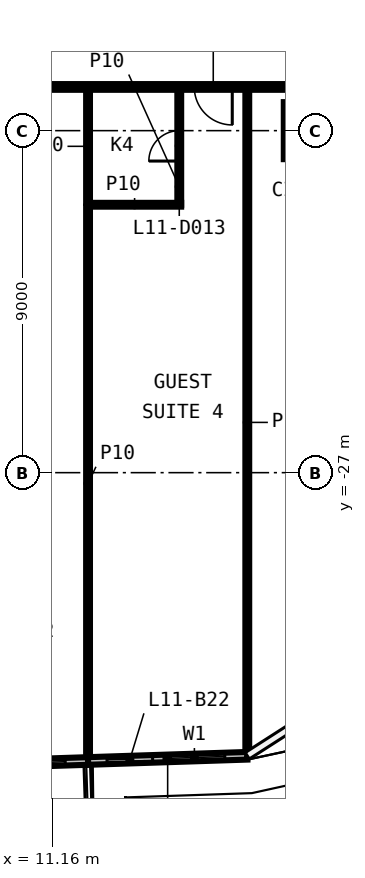
"""IFC4 building model, lengths in metres.
Left out: names, types, materials, properties, quantities, classifications, styles, units other than length and angle.
Written with IfcOpenShell. Run it as: python <this file> out.ifc"""

import sys

from ifc_helpers import new_model, si_unit, direction, frame, frame_2d, origin, origin_2d, place, context, subcontext, project, spatial, rectangle, extrude, element, fill, save


model = new_model("IFC4")
c1 = context("Model", 3, precision=1e-05, world=origin(), true_north=direction((0.0, 1.0)))
c2 = subcontext(c1, "Body", "Model", "MODEL_VIEW")
j1 = project(units=[si_unit("LENGTHUNIT", "METRE"), si_unit("PLANEANGLEUNIT", "RADIAN")], contexts=[c1])
p1 = place(None, origin())
s1 = spatial("IfcSite", under=j1, at=p1, CompositionType="ELEMENT")
p2 = place(p1, origin())
s2 = spatial("IfcBuilding", under=s1, at=p2, CompositionType="ELEMENT")
p3 = place(p2, frame((0.0, 0.0, 62.5)))
s3 = spatial("IfcBuildingStorey", under=s2, at=p3, CompositionType="ELEMENT", Elevation=62.5)
p4 = place(p3, frame((18.0, -18.0, 0.0), z_axis=(0.0, 0.0, 1.0), x_axis=(1.0, 0.0, 0.0)))
e1 = element("IfcColumn", 1, at=p4, inside=s3, PredefinedType="COLUMN", context=c2, shape_type="SweptSolid", body=[
    extrude(rectangle(XDim=1.5, YDim=1.5, at=origin_2d()), origin(), (0.0, 0.0, 1.0), 3.3),
])
p5 = place(p3, frame((12.099, -19.95, 0.0), z_axis=(0.0, 0.0, 1.0), x_axis=(1.0, 0.0, 0.0)))
e2 = element("IfcWall", 2, at=p5, inside=s3, PredefinedType="PARTITIONING", context=c2, shape_type="SweptSolid", body=[
    extrude(rectangle(XDim=2.45, YDim=0.1, at=frame_2d((1.225, 0.0))), origin(), (0.0, 0.0, 1.0), 3.3),
])
p6 = place(p3, frame((19.925, -16.85, 0.0), z_axis=(0.0, 0.0, 1.0), x_axis=(-1.0, 0.0, 0.0)))
e3 = element("IfcWall", 3, at=p6, inside=s3, PredefinedType="PARTITIONING", context=c2, shape_type="SweptSolid", body=[
    extrude(rectangle(XDim=39.85, YDim=0.15, at=frame_2d((19.925, 0.0))), origin(), (0.0, 0.0, 1.0), 3.3),
])
p7 = place(p6, frame((35.041, 0.0, 0.0)))
e4 = element("IfcOpeningElement", 4, at=p7, cuts=e3, PredefinedType="OPENING", context=c2, shape_type="SweptSolid", body=[
    extrude(rectangle(XDim=0.9, YDim=2.1, at=frame_2d((0.45, 1.05))), frame((0.0, 0.085, 0.0), z_axis=(0.0, -1.0, 0.0), x_axis=(1.0, 0.0, 0.0)), (0.0, 0.0, 1.0), 0.17),
])
p8 = place(p6, frame((31.0, 0.0, 0.0)))
e5 = element("IfcOpeningElement", 5, at=p8, cuts=e3, PredefinedType="OPENING", context=c2, shape_type="SweptSolid", body=[
    extrude(rectangle(XDim=1.0, YDim=2.1, at=frame_2d((0.5, 1.05))), frame((0.0, 0.085, 0.0), z_axis=(0.0, -1.0, 0.0), x_axis=(1.0, 0.0, 0.0)), (0.0, 0.0, 1.0), 0.17),
])
p9 = place(p6, frame((25.711, 0.0, 0.0)))
e6 = element("IfcOpeningElement", 6, at=p9, cuts=e3, PredefinedType="OPENING", context=c2, shape_type="SweptSolid", body=[
    extrude(rectangle(XDim=0.9, YDim=2.1, at=frame_2d((0.45, 1.05))), frame((0.0, 0.085, 0.0), z_axis=(0.0, -1.0, 0.0), x_axis=(1.0, 0.0, 0.0)), (0.0, 0.0, 1.0), 0.17),
])
p10 = place(p6, frame((22.072, 0.0, 0.0)))
e7 = element("IfcOpeningElement", 7, at=p10, cuts=e3, PredefinedType="OPENING", context=c2, shape_type="SweptSolid", body=[
    extrude(rectangle(XDim=0.9, YDim=2.1, at=frame_2d((0.45, 1.05))), frame((0.0, 0.085, 0.0), z_axis=(0.0, -1.0, 0.0), x_axis=(1.0, 0.0, 0.0)), (0.0, 0.0, 1.0), 0.17),
])
p11 = place(p6, frame((17.034, 0.0, 0.0)))
e8 = element("IfcOpeningElement", 8, at=p11, cuts=e3, PredefinedType="OPENING", context=c2, shape_type="SweptSolid", body=[
    extrude(rectangle(XDim=0.9, YDim=2.1, at=frame_2d((0.45, 1.05))), frame((0.0, 0.085, 0.0), z_axis=(0.0, -1.0, 0.0), x_axis=(1.0, 0.0, 0.0)), (0.0, 0.0, 1.0), 0.17),
])
p12 = place(p6, frame((13.675, 0.0, 0.0)))
e9 = element("IfcOpeningElement", 9, at=p12, cuts=e3, PredefinedType="OPENING", context=c2, shape_type="SweptSolid", body=[
    extrude(rectangle(XDim=0.9, YDim=2.1, at=frame_2d((0.45, 1.05))), frame((0.0, 0.085, 0.0), z_axis=(0.0, -1.0, 0.0), x_axis=(1.0, 0.0, 0.0)), (0.0, 0.0, 1.0), 0.17),
])
p13 = place(p6, frame((4.031, 0.0, 0.0)))
e10 = element("IfcOpeningElement", 10, at=p13, cuts=e3, PredefinedType="OPENING", context=c2, shape_type="SweptSolid", body=[
    extrude(rectangle(XDim=1.0, YDim=2.1, at=frame_2d((0.5, 1.05))), frame((0.0, 0.085, 0.0), z_axis=(0.0, -1.0, 0.0), x_axis=(1.0, 0.0, 0.0)), (0.0, 0.0, 1.0), 0.17),
])
p14 = place(p3, frame((16.289, -34.43, 0.0), z_axis=(0.0, 0.0, 1.0), x_axis=(0.0, 1.0, 0.0)))
e11 = element("IfcWall", 11, at=p14, inside=s3, PredefinedType="PARTITIONING", context=c2, shape_type="SweptSolid", body=[
    extrude(rectangle(XDim=17.505, YDim=0.1, at=frame_2d((8.752, 0.0))), origin(), (0.0, 0.0, 1.0), 3.3),
])
p15 = place(p3, frame((14.499, -19.95, 0.0), z_axis=(0.0, 0.0, 1.0), x_axis=(0.0, 1.0, 0.0)))
e12 = element("IfcWall", 12, at=p15, inside=s3, PredefinedType="PARTITIONING", context=c2, shape_type="SweptSolid", body=[
    extrude(rectangle(XDim=3.025, YDim=0.1, at=frame_2d((1.512, 0.0))), origin(), (0.0, 0.0, 1.0), 3.3),
])
p16 = place(p15, frame((1.15, 0.0, 0.0)))
e13 = element("IfcOpeningElement", 13, at=p16, cuts=e12, PredefinedType="OPENING", context=c2, shape_type="SweptSolid", body=[
    extrude(rectangle(XDim=0.8, YDim=2.1, at=frame_2d((0.4, 1.05))), frame((0.0, 0.06, 0.0), z_axis=(0.0, -1.0, 0.0), x_axis=(1.0, 0.0, 0.0)), (0.0, 0.0, 1.0), 0.12),
])
p17 = place(p3, frame((12.099, -34.567, 0.0), z_axis=(0.0, 0.0, 1.0), x_axis=(0.0, 1.0, 0.0)))
e14 = element("IfcWall", 14, at=p17, inside=s3, PredefinedType="PARTITIONING", context=c2, shape_type="SweptSolid", body=[
    extrude(rectangle(XDim=14.567, YDim=0.1, at=frame_2d((7.284, 0.0))), origin(), (0.0, 0.0, 1.0), 3.3),
])
p18 = place(p3, frame((12.099, -19.9, 0.0), z_axis=(0.0, 0.0, 1.0), x_axis=(0.0, 1.0, 0.0)))
e15 = element("IfcWall", 15, at=p18, inside=s3, PredefinedType="PARTITIONING", context=c2, shape_type="SweptSolid", body=[
    extrude(rectangle(XDim=2.975, YDim=0.1, at=frame_2d((1.487, 0.0))), origin(), (0.0, 0.0, 1.0), 3.3),
])
p19 = place(p3, frame((-4.697, -35.136, 0.0), z_axis=(0.0, 0.0, 1.0), x_axis=(0.999466983916, 0.032645796998, 0.0)))
e16 = element("IfcWall", 16, at=p19, inside=s3, PredefinedType="SOLIDWALL", context=c2, shape_type="SweptSolid", body=[
    extrude(rectangle(XDim=16.804, YDim=0.2, at=frame_2d((8.402, 0.0))), origin(), (0.0, 0.0, 1.0), 3.3),
])
p20 = place(p19, frame((2.0, 0.0, 0.6)))
e17 = element("IfcOpeningElement", 17, at=p20, cuts=e16, PredefinedType="OPENING", context=c2, shape_type="SweptSolid", body=[
    extrude(rectangle(XDim=1.6, YDim=2.4, at=frame_2d((0.8, 1.2))), frame((0.0, 0.11, 0.0), z_axis=(0.0, -1.0, 0.0), x_axis=(1.0, 0.0, 0.0)), (0.0, 0.0, 1.0), 0.22),
])
p21 = place(p19, frame((0.5, 0.0, 0.0)))
e18 = element("IfcOpeningElement", 18, at=p21, cuts=e16, PredefinedType="OPENING", context=c2, shape_type="SweptSolid", body=[
    extrude(rectangle(XDim=1.2, YDim=2.4, at=frame_2d((0.6, 1.2))), frame((0.0, 0.11, 0.0), z_axis=(0.0, -1.0, 0.0), x_axis=(1.0, 0.0, 0.0)), (0.0, 0.0, 1.0), 0.22),
])
p22 = place(p19, frame((6.201, 0.0, 0.6)))
e19 = element("IfcOpeningElement", 19, at=p22, cuts=e16, PredefinedType="OPENING", context=c2, shape_type="SweptSolid", body=[
    extrude(rectangle(XDim=1.6, YDim=2.4, at=frame_2d((0.8, 1.2))), frame((0.0, 0.11, 0.0), z_axis=(0.0, -1.0, 0.0), x_axis=(1.0, 0.0, 0.0)), (0.0, 0.0, 1.0), 0.22),
])
p23 = place(p19, frame((4.701, 0.0, 0.0)))
e20 = element("IfcOpeningElement", 20, at=p23, cuts=e16, PredefinedType="OPENING", context=c2, shape_type="SweptSolid", body=[
    extrude(rectangle(XDim=1.2, YDim=2.4, at=frame_2d((0.6, 1.2))), frame((0.0, 0.11, 0.0), z_axis=(0.0, -1.0, 0.0), x_axis=(1.0, 0.0, 0.0)), (0.0, 0.0, 1.0), 0.22),
])
p24 = place(p19, frame((10.402, 0.0, 0.6)))
e21 = element("IfcOpeningElement", 21, at=p24, cuts=e16, PredefinedType="OPENING", context=c2, shape_type="SweptSolid", body=[
    extrude(rectangle(XDim=1.6, YDim=2.4, at=frame_2d((0.8, 1.2))), frame((0.0, 0.11, 0.0), z_axis=(0.0, -1.0, 0.0), x_axis=(1.0, 0.0, 0.0)), (0.0, 0.0, 1.0), 0.22),
])
p25 = place(p19, frame((8.902, 0.0, 0.0)))
e22 = element("IfcOpeningElement", 22, at=p25, cuts=e16, PredefinedType="OPENING", context=c2, shape_type="SweptSolid", body=[
    extrude(rectangle(XDim=1.2, YDim=2.4, at=frame_2d((0.6, 1.2))), frame((0.0, 0.11, 0.0), z_axis=(0.0, -1.0, 0.0), x_axis=(1.0, 0.0, 0.0)), (0.0, 0.0, 1.0), 0.22),
])
p26 = place(p19, frame((14.603, 0.0, 0.6)))
e23 = element("IfcOpeningElement", 23, at=p26, cuts=e16, PredefinedType="OPENING", context=c2, shape_type="SweptSolid", body=[
    extrude(rectangle(XDim=1.6, YDim=2.4, at=frame_2d((0.8, 1.2))), frame((0.0, 0.11, 0.0), z_axis=(0.0, -1.0, 0.0), x_axis=(1.0, 0.0, 0.0)), (0.0, 0.0, 1.0), 0.22),
])
p27 = place(p19, frame((12.903, 0.0, 0.0)))
e24 = element("IfcOpeningElement", 24, at=p27, cuts=e16, PredefinedType="OPENING", context=c2, shape_type="SweptSolid", body=[
    extrude(rectangle(XDim=1.2, YDim=2.4, at=frame_2d((0.6, 1.2))), frame((0.0, 0.11, 0.0), z_axis=(0.0, -1.0, 0.0), x_axis=(1.0, 0.0, 0.0)), (0.0, 0.0, 1.0), 0.22),
])
p28 = place(p3, frame((12.099, -34.587, 0.0), z_axis=(0.0, 0.0, 1.0), x_axis=(0.999468058802, 0.032612872214, 0.0)))
e25 = element("IfcWall", 25, at=p28, inside=s3, PredefinedType="SOLIDWALL", context=c2, shape_type="SweptSolid", body=[
    extrude(rectangle(XDim=4.192, YDim=0.2, at=frame_2d((2.096, 0.0))), origin(), (0.0, 0.0, 1.0), 3.3),
])
p29 = place(p28, frame((2.0, 0.0, 0.6)))
e26 = element("IfcOpeningElement", 26, at=p29, cuts=e25, PredefinedType="OPENING", context=c2, shape_type="SweptSolid", body=[
    extrude(rectangle(XDim=1.6, YDim=2.4, at=frame_2d((0.8, 1.2))), frame((0.0, 0.11, 0.0), z_axis=(0.0, -1.0, 0.0), x_axis=(1.0, 0.0, 0.0)), (0.0, 0.0, 1.0), 0.22),
])
p30 = place(p28, frame((0.5, 0.0, 0.0)))
e27 = element("IfcOpeningElement", 27, at=p30, cuts=e25, PredefinedType="OPENING", context=c2, shape_type="SweptSolid", body=[
    extrude(rectangle(XDim=1.2, YDim=2.4, at=frame_2d((0.6, 1.2))), frame((0.0, 0.11, 0.0), z_axis=(0.0, -1.0, 0.0), x_axis=(1.0, 0.0, 0.0)), (0.0, 0.0, 1.0), 0.22),
])
p31 = place(p16, origin())
e28 = element("IfcDoor", 28, at=p31, inside=s3, OperationType="SINGLE_SWING_LEFT", PredefinedType="DOOR", context=c2, shape_type="SweptSolid", body=[
    extrude(rectangle(XDim=0.8, YDim=2.1, at=frame_2d((0.4, 1.05))), frame((0.0, 0.025, 0.0), z_axis=(0.0, -1.0, 0.0), x_axis=(1.0, 0.0, 0.0)), (0.0, 0.0, 1.0), 0.05),
])
fill(e13, e28)
p32 = place(p13, origin())
e29 = element("IfcDoor", 29, at=p32, inside=s3, OperationType="SINGLE_SWING_RIGHT", PredefinedType="DOOR", context=c2, shape_type="SweptSolid", body=[
    extrude(rectangle(XDim=1.0, YDim=2.1, at=frame_2d((0.5, 1.05))), frame((0.0, 0.025, 0.0), z_axis=(0.0, -1.0, 0.0), x_axis=(1.0, 0.0, 0.0)), (0.0, 0.0, 1.0), 0.05),
])
fill(e10, e29)
p33 = place(p26, origin())
e30 = element("IfcWindow", 30, at=p33, inside=s3, PartitioningType="SINGLE_PANEL", PredefinedType="WINDOW", context=c2, shape_type="SweptSolid", body=[
    extrude(rectangle(XDim=1.6, YDim=2.4, at=frame_2d((0.8, 1.2))), frame((0.0, 0.03, 0.0), z_axis=(0.0, -1.0, 0.0), x_axis=(1.0, 0.0, 0.0)), (0.0, 0.0, 1.0), 0.06),
])
fill(e23, e30)
p34 = place(p29, origin())
e31 = element("IfcWindow", 31, at=p34, inside=s3, PartitioningType="SINGLE_PANEL", PredefinedType="WINDOW", context=c2, shape_type="SweptSolid", body=[
    extrude(rectangle(XDim=1.6, YDim=2.4, at=frame_2d((0.8, 1.2))), frame((0.0, 0.03, 0.0), z_axis=(0.0, -1.0, 0.0), x_axis=(1.0, 0.0, 0.0)), (0.0, 0.0, 1.0), 0.06),
])
fill(e26, e31)
p35 = place(p30, origin())
e32 = element("IfcDoor", 32, at=p35, inside=s3, OperationType="SLIDING_TO_LEFT", PredefinedType="DOOR", context=c2, shape_type="SweptSolid", body=[
    extrude(rectangle(XDim=1.2, YDim=2.4, at=frame_2d((0.6, 1.2))), frame((0.0, 0.025, 0.0), z_axis=(0.0, -1.0, 0.0), x_axis=(1.0, 0.0, 0.0)), (0.0, 0.0, 1.0), 0.05),
])
fill(e27, e32)
save(model, sys.argv[1])
